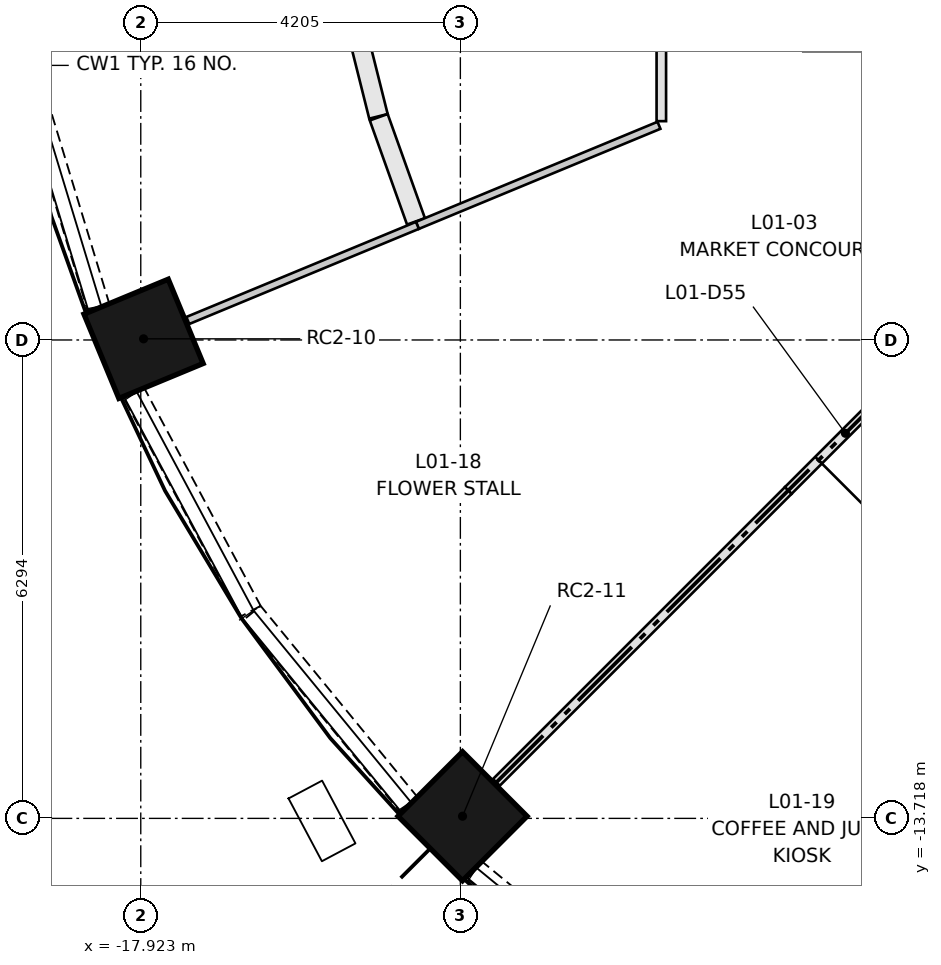
"""IFC4 building model, lengths in metres.
Left out: names, types, materials, properties, quantities, classifications, styles, units other than length and angle.
Written with IfcOpenShell. Run it as: python <this file> out.ifc"""

import sys

from ifc_helpers import new_model, si_unit, direction, frame, frame_2d, origin, origin_2d, place, context, subcontext, project, spatial, rectangle, extrude, element, fill, save


model = new_model("IFC4")
c1 = context("Model", 3, precision=1e-05, world=origin(), true_north=direction((0.0, 1.0)))
c2 = subcontext(c1, "Body", "Model", "MODEL_VIEW")
j1 = project(units=[si_unit("LENGTHUNIT", "METRE"), si_unit("PLANEANGLEUNIT", "RADIAN")], contexts=[c1])
p1 = place(None, origin())
s1 = spatial("IfcSite", under=j1, at=p1, CompositionType="ELEMENT")
p2 = place(p1, origin())
s2 = spatial("IfcBuilding", under=s1, at=p2, CompositionType="ELEMENT")
p3 = place(p2, frame((0.0, 0.0, 5.2)))
s3 = spatial("IfcBuildingStorey", under=s2, at=p3, CompositionType="ELEMENT", Elevation=5.2)
for number, where, z_axis, x_axis in (
    (1, (-17.886, -7.409, 0.0), (0.0, 0.0, 1.0), (-0.924, -0.383, 0.0)),
    (2, (-13.69, -13.69, 0.0), (0.0, 0.0, 1.0), (-0.707, -0.707, 0.0)),
):
    element("IfcColumn", number, at=place(p3, frame(where, z_axis=z_axis, x_axis=x_axis)), inside=s3, PredefinedType="COLUMN", context=c2, shape_type="SweptSolid", body=[
        extrude(rectangle(XDim=1.2, YDim=1.2, at=origin_2d()), origin(), (0.0, 0.0, 1.0), 4.7),
    ])
p4 = place(p3, frame((-19.425, -3.878, 0.0), z_axis=(0.0, 0.0, 1.0), x_axis=(0.290301164038, -0.956935334366, 0.0)))
e3 = element("IfcWall", 3, at=p4, inside=s3, PredefinedType="SOLIDWALL", context=c2, shape_type="SweptSolid", body=[
    extrude(rectangle(XDim=3.252, YDim=0.3, at=frame_2d((1.626, 0.0))), origin(), (0.0, 0.0, 1.0), 0.45),
])
p5 = place(p3, frame((-18.011, -8.124, 0.0), z_axis=(0.0, 0.0, 1.0), x_axis=(0.471308820961, -0.881968250723, 0.0)))
e4 = element("IfcWall", 4, at=p5, inside=s3, PredefinedType="SOLIDWALL", context=c2, shape_type="SweptSolid", body=[
    extrude(rectangle(XDim=3.252, YDim=0.3, at=frame_2d((1.626, 0.0))), origin(), (0.0, 0.0, 1.0), 0.45),
])
for number, where, z_axis, x_axis in (
    (5, (-16.461, -11.018, 0.0), (0.0, 0.0, 1.0), (0.634, -0.773, 0.0)),
    (6, (-13.531, -14.399, 0.0), (0.0, 0.0, 1.0), (0.773, -0.634, 0.0)),
):
    element("IfcWall", number, at=place(p3, frame(where, z_axis=z_axis, x_axis=x_axis)), inside=s3, PredefinedType="SOLIDWALL", context=c2, shape_type="SweptSolid", body=[
        extrude(rectangle(XDim=3.251, YDim=0.3, at=frame_2d((1.626, 0.0))), origin(), (0.0, 0.0, 1.0), 0.45),
    ])
p6 = place(p3, frame((-7.874, -7.874, 0.0), z_axis=(0.0, 0.0, 1.0), x_axis=(-0.707106781187, -0.707106781187, 0.0)))
e7 = element("IfcWall", 7, at=p6, inside=s3, PredefinedType="PARTITIONING", context=c2, shape_type="SweptSolid", body=[
    extrude(rectangle(XDim=2.165, YDim=0.125, at=frame_2d((1.082, 0.0))), origin(), (0.0, 0.0, 1.0), 4.3),
])
p7 = place(p6, frame((0.6, 0.0, 0.0)))
e8 = element("IfcOpeningElement", 8, at=p7, cuts=e7, PredefinedType="OPENING", context=c2, shape_type="SweptSolid", body=[
    extrude(rectangle(XDim=1.0, YDim=2.1, at=frame_2d((0.5, 1.05))), frame((0.0, 0.073, 0.0), z_axis=(0.0, -1.0, 0.0), x_axis=(1.0, 0.0, 0.0)), (0.0, 0.0, 1.0), 0.145),
])
p8 = place(p3, frame((-11.074, -4.545, 0.0), z_axis=(0.0, 0.0, 1.0), x_axis=(0.0, 1.0, 0.0)))
e9 = element("IfcWall", 9, at=p8, inside=s3, PredefinedType="PARTITIONING", context=c2, shape_type="SweptSolid", body=[
    extrude(rectangle(XDim=4.545, YDim=0.125, at=frame_2d((2.272, 0.0))), origin(), (0.0, 0.0, 1.0), 4.3),
])
p9 = place(p8, frame((1.8, 0.0, 0.0)))
e10 = element("IfcOpeningElement", 10, at=p9, cuts=e9, PredefinedType="OPENING", context=c2, shape_type="SweptSolid", body=[
    extrude(rectangle(XDim=1.0, YDim=2.1, at=frame_2d((0.5, 1.05))), frame((0.0, 0.073, 0.0), z_axis=(0.0, -1.0, 0.0), x_axis=(1.0, 0.0, 0.0)), (0.0, 0.0, 1.0), 0.145),
])
p10 = place(p3, frame((-14.796, -4.482, 0.0), z_axis=(0.0, 0.0, 1.0), x_axis=(-0.242917416803, 0.970046972375, 0.0)))
e11 = element("IfcWall", 11, at=p10, inside=s3, PredefinedType="PARTITIONING", context=c2, shape_type="SweptSolid", body=[
    extrude(rectangle(XDim=1.505, YDim=0.25, at=frame_2d((0.752, 0.0))), origin(), (0.0, 0.0, 1.0), 4.3),
])
p11 = place(p3, frame((-14.302, -5.863, 0.0), z_axis=(0.0, 0.0, 1.0), x_axis=(-0.336995469999, 0.941506268274, 0.0)))
e12 = element("IfcWall", 12, at=p11, inside=s3, PredefinedType="PARTITIONING", context=c2, shape_type="SweptSolid", body=[
    extrude(rectangle(XDim=1.455, YDim=0.25, at=frame_2d((0.728, 0.0))), origin(), (0.0, 0.0, 1.0), 4.3),
])
p12 = place(p3, frame((-11.105, -4.6, 0.0), z_axis=(0.0, 0.0, 1.0), x_axis=(-0.92388535755, -0.382669369174, 0.0)))
e13 = element("IfcWall", 13, at=p12, inside=s3, PredefinedType="PARTITIONING", context=c2, shape_type="SweptSolid", body=[
    extrude(rectangle(XDim=3.44, YDim=0.1, at=frame_2d((1.72, 0.0))), origin(), (0.0, 0.0, 1.0), 4.3),
])
p13 = place(p3, frame((-14.283, -5.916, 0.0), z_axis=(0.0, 0.0, 1.0), x_axis=(-0.923865769093, -0.382716658507, 0.0)))
e14 = element("IfcWall", 14, at=p13, inside=s3, PredefinedType="PARTITIONING", context=c2, shape_type="SweptSolid", body=[
    extrude(rectangle(XDim=3.27, YDim=0.1, at=frame_2d((1.635, 0.0))), origin(), (0.0, 0.0, 1.0), 4.3),
])
p14 = place(p3, frame((-9.405, -9.405, 0.0), z_axis=(0.0, 0.0, 1.0), x_axis=(-0.707106781187, -0.707106781187, 0.0)))
e15 = element("IfcWall", 15, at=p14, inside=s3, PredefinedType="PARTITIONING", context=c2, shape_type="SweptSolid", body=[
    extrude(rectangle(XDim=5.43, YDim=0.125, at=frame_2d((2.715, 0.0))), origin(), (0.0, 0.0, 1.0), 4.3),
])
p15 = place(p7, origin())
e16 = element("IfcDoor", 16, at=p15, inside=s3, OperationType="SINGLE_SWING_RIGHT", PredefinedType="DOOR", context=c2, shape_type="SweptSolid", body=[
    extrude(rectangle(XDim=1.0, YDim=2.1, at=frame_2d((0.5, 1.05))), frame((0.0, 0.025, 0.0), z_axis=(0.0, -1.0, 0.0), x_axis=(1.0, 0.0, 0.0)), (0.0, 0.0, 1.0), 0.05),
])
fill(e8, e16)
save(model, sys.argv[1])
